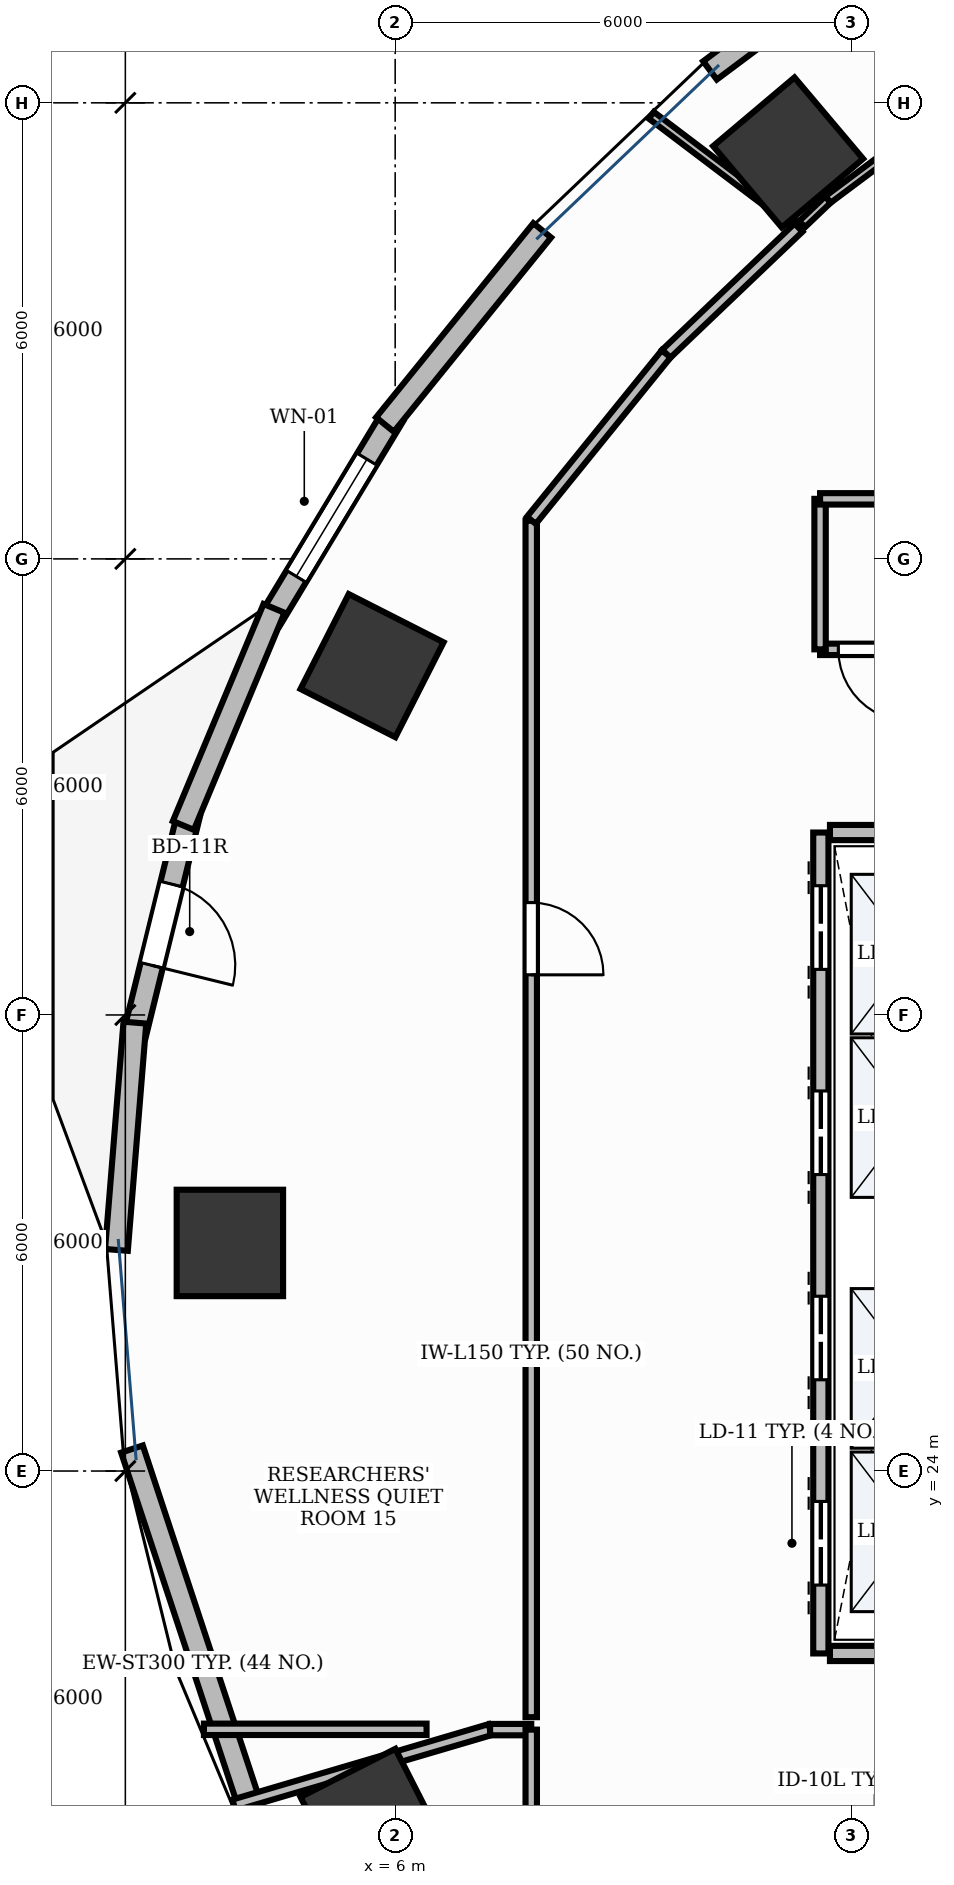
"""IFC4 building model, lengths in metres.
Left out: names, types, materials, properties, quantities, classifications, styles, units other than length and angle.
Written with IfcOpenShell. Run it as: python <this file> out.ifc"""

import sys

from ifc_helpers import new_model, si_unit, direction, frame, frame_2d, origin, origin_2d, place, context, subcontext, project, spatial, rectangle, extrude, element, fill, save


model = new_model("IFC4")
c1 = context("Model", 3, precision=1e-05, world=origin(), true_north=direction((0.0, 1.0)))
c2 = subcontext(c1, "Body", "Model", "MODEL_VIEW")
j1 = project(units=[si_unit("LENGTHUNIT", "METRE"), si_unit("PLANEANGLEUNIT", "RADIAN")], contexts=[c1])
p1 = place(None, origin())
s1 = spatial("IfcSite", under=j1, at=p1, CompositionType="ELEMENT")
p2 = place(p1, origin())
s2 = spatial("IfcBuilding", under=s1, at=p2, CompositionType="ELEMENT")
p3 = place(p2, frame((0.0, 0.0, 42.6)))
s3 = spatial("IfcBuildingStorey", under=s2, at=p3, CompositionType="ELEMENT", Elevation=42.6)
for number, where, z_axis, x_axis in (
    (1, (11.17, 41.347, -0.0), (0.0, 0.0, 1.0), (0.764, 0.645, 0.0)),
    (2, (5.696, 34.596, -0.0), (0.0, 0.0, 1.0), (0.453, 0.891, 0.0)),
    (3, (3.825, 27.001, -0.0), (0.0, 0.0, 1.0), (0.0, 1.0, 0.0)),
    (4, (5.696, 19.404, -0.0), (0.0, 0.0, 1.0), (-0.453, 0.891, 0.0)),
):
    element("IfcColumn", number, at=place(p3, frame(where, z_axis=z_axis, x_axis=x_axis)), inside=s3, PredefinedType="COLUMN", context=c2, shape_type="SweptSolid", body=[
        extrude(rectangle(XDim=1.4, YDim=1.4, at=origin_2d()), origin(), (0.0, 0.0, 1.0), 3.901),
    ])
p4 = place(p3, frame((5.975, 37.886, 0.0), z_axis=(0.0, 0.0, 1.0), x_axis=(-0.516447962267, -0.856318575222, 0.0)))
e5 = element("IfcWall", 5, at=p4, inside=s3, PredefinedType="STANDARD", context=c2, shape_type="SweptSolid", body=[
    extrude(rectangle(XDim=3.143, YDim=0.3, at=frame_2d((1.571, 0.0))), origin(), (0.0, 0.0, 1.0), 3.47),
])
p5 = place(p4, frame((0.671, 0.0, 0.9)))
e6 = element("IfcOpeningElement", 6, at=p5, cuts=e5, PredefinedType="OPENING", context=c2, shape_type="SweptSolid", body=[
    extrude(rectangle(XDim=1.8, YDim=2.1, at=frame_2d((0.9, 1.05))), frame((0.0, 0.165, 0.0), z_axis=(0.0, -1.0, 0.0), x_axis=(1.0, 0.0, 0.0)), (0.0, 0.0, 1.0), 0.33),
])
p6 = place(p3, frame((3.285, 32.641, 0.0), z_axis=(0.0, 0.0, 1.0), x_axis=(-0.238522035896, -0.971137085273, 0.0)))
e7 = element("IfcWall", 7, at=p6, inside=s3, PredefinedType="STANDARD", context=c2, shape_type="SweptSolid", body=[
    extrude(rectangle(XDim=2.993, YDim=0.3, at=frame_2d((1.497, 0.0))), origin(), (0.0, 0.0, 1.0), 3.9),
])
p7 = place(p6, frame((0.946, 0.0, 0.0)))
e8 = element("IfcOpeningElement", 8, at=p7, cuts=e7, PredefinedType="OPENING", context=c2, shape_type="SweptSolid", body=[
    extrude(rectangle(XDim=1.1, YDim=2.15, at=frame_2d((0.55, 1.075))), frame((0.0, 0.165, 0.0), z_axis=(0.0, -1.0, 0.0), x_axis=(1.0, 0.0, 0.0)), (0.0, 0.0, 1.0), 0.33),
])
p8 = place(p3, frame((12.961, 44.535, 0.0), z_axis=(0.0, 0.0, 1.0), x_axis=(-0.800823020995, -0.598901067827, 0.0)))
e9 = element("IfcWall", 9, at=p8, inside=s3, PredefinedType="STANDARD", context=c2, shape_type="SweptSolid", body=[
    extrude(rectangle(XDim=3.521, YDim=0.3, at=frame_2d((1.76, 0.0))), origin(), (0.0, 0.0, 1.0), 3.9),
])
p9 = place(p3, frame((7.934, 40.323, 0.0), z_axis=(0.0, 0.0, 1.0), x_axis=(-0.629221727718, -0.777225847079, 0.0)))
e10 = element("IfcWall", 10, at=p9, inside=s3, PredefinedType="STANDARD", context=c2, shape_type="SweptSolid", body=[
    extrude(rectangle(XDim=3.288, YDim=0.3, at=frame_2d((1.644, 0.0))), origin(), (0.0, 0.0, 1.0), 3.47),
])
p10 = place(p3, frame((4.406, 35.349, 0.0), z_axis=(0.0, 0.0, 1.0), x_axis=(-0.38535448421, -0.922768617531, 0.0)))
e11 = element("IfcWall", 11, at=p10, inside=s3, PredefinedType="STANDARD", context=c2, shape_type="SweptSolid", body=[
    extrude(rectangle(XDim=3.095, YDim=0.3, at=frame_2d((1.548, 0.0))), origin(), (0.0, 0.0, 1.0), 3.9),
])
p11 = place(p3, frame((2.576, 29.899, 0.0), z_axis=(0.0, 0.0, 1.0), x_axis=(-0.080890160317, -0.996723021689, 0.0)))
e12 = element("IfcWall", 12, at=p11, inside=s3, PredefinedType="STANDARD", context=c2, shape_type="SweptSolid", body=[
    extrude(rectangle(XDim=3.0, YDim=0.3, at=frame_2d((1.5, 0.0))), origin(), (0.0, 0.0, 1.0), 3.9),
])
p12 = place(p3, frame((2.537, 24.289, 0.0), z_axis=(0.0, 0.0, 1.0), x_axis=(0.31372816724, -0.949512841978, 0.0)))
e13 = element("IfcWall", 13, at=p12, inside=s3, PredefinedType="STANDARD", context=c2, shape_type="SweptSolid", body=[
    extrude(rectangle(XDim=5.951, YDim=0.3, at=frame_2d((2.976, 0.0))), origin(), (0.0, 0.0, 1.0), 3.9),
])
p13 = place(p3, frame((11.6, 21.6, 0.0), z_axis=(0.0, 0.0, 1.0), x_axis=(0.0, 1.0, 0.0)))
e14 = element("IfcWall", 14, at=p13, inside=s3, PredefinedType="PARTITIONING", context=c2, shape_type="SweptSolid", body=[
    extrude(rectangle(XDim=10.8, YDim=0.2, at=frame_2d((5.4, 0.0))), origin(), (0.0, 0.0, 1.0), 2.91),
])
p14 = place(p13, frame((0.9, 0.0, 0.0)))
e15 = element("IfcOpeningElement", 15, at=p14, cuts=e14, PredefinedType="OPENING", context=c2, shape_type="SweptSolid", body=[
    extrude(rectangle(XDim=1.1, YDim=2.2, at=frame_2d((0.55, 1.1))), frame((0.0, 0.115, 0.0), z_axis=(0.0, -1.0, 0.0), x_axis=(1.0, 0.0, 0.0)), (0.0, 0.0, 1.0), 0.23),
])
p15 = place(p13, frame((3.6, 0.0, 0.0)))
e16 = element("IfcOpeningElement", 16, at=p15, cuts=e14, PredefinedType="OPENING", context=c2, shape_type="SweptSolid", body=[
    extrude(rectangle(XDim=1.1, YDim=2.2, at=frame_2d((0.55, 1.1))), frame((0.0, 0.115, 0.0), z_axis=(0.0, -1.0, 0.0), x_axis=(1.0, 0.0, 0.0)), (0.0, 0.0, 1.0), 0.23),
])
p16 = place(p13, frame((6.3, 0.0, 0.0)))
e17 = element("IfcOpeningElement", 17, at=p16, cuts=e14, PredefinedType="OPENING", context=c2, shape_type="SweptSolid", body=[
    extrude(rectangle(XDim=1.1, YDim=2.2, at=frame_2d((0.55, 1.1))), frame((0.0, 0.115, 0.0), z_axis=(0.0, -1.0, 0.0), x_axis=(1.0, 0.0, 0.0)), (0.0, 0.0, 1.0), 0.23),
])
p17 = place(p13, frame((9.0, 0.0, 0.0)))
e18 = element("IfcOpeningElement", 18, at=p17, cuts=e14, PredefinedType="OPENING", context=c2, shape_type="SweptSolid", body=[
    extrude(rectangle(XDim=1.1, YDim=2.2, at=frame_2d((0.55, 1.1))), frame((0.0, 0.115, 0.0), z_axis=(0.0, -1.0, 0.0), x_axis=(1.0, 0.0, 0.0)), (0.0, 0.0, 1.0), 0.23),
])
for number, where, z_axis, x_axis in (
    (19, (11.72, 21.6, 0.0), (0.0, 0.0, 1.0), (1.0, 0.0, 0.0)),
    (20, (11.72, 32.4, 0.0), (0.0, 0.0, 1.0), (1.0, 0.0, 0.0)),
):
    element("IfcWall", number, at=place(p3, frame(where, z_axis=z_axis, x_axis=x_axis)), inside=s3, PredefinedType="PARTITIONING", context=c2, shape_type="SweptSolid", body=[
        extrude(rectangle(XDim=2.16, YDim=0.2, at=frame_2d((1.08, 0.0))), origin(), (0.0, 0.0, 1.0), 2.91),
    ])
p18 = place(p3, frame((21.74, 34.81, 0.0), z_axis=(0.0, 0.0, 1.0), x_axis=(-1.0, 0.0, 0.0)))
e21 = element("IfcWall", 21, at=p18, inside=s3, PredefinedType="PARTITIONING", context=c2, shape_type="SweptSolid", body=[
    extrude(rectangle(XDim=10.15, YDim=0.15, at=frame_2d((5.075, 0.0))), origin(), (0.0, 0.0, 1.0), 2.91),
])
p19 = place(p18, frame((8.96, 0.0, 0.0)))
e22 = element("IfcOpeningElement", 22, at=p19, cuts=e21, PredefinedType="OPENING", context=c2, shape_type="SweptSolid", body=[
    extrude(rectangle(XDim=0.95, YDim=2.15, at=frame_2d((0.475, 1.075))), frame((0.0, 0.09, 0.0), z_axis=(0.0, -1.0, 0.0), x_axis=(1.0, 0.0, 0.0)), (0.0, 0.0, 1.0), 0.18),
])
p20 = place(p3, frame((7.79, 36.501, 0.0), z_axis=(0.0, 0.0, 1.0), x_axis=(0.0, -1.0, 0.0)))
e23 = element("IfcWall", 23, at=p20, inside=s3, PredefinedType="PARTITIONING", context=c2, shape_type="SweptSolid", body=[
    extrude(rectangle(XDim=15.74, YDim=0.15, at=frame_2d((7.87, 0.0))), origin(), (0.0, 0.0, 1.0), 2.91),
])
p21 = place(p20, frame((5.023, 0.0, 0.0)))
e24 = element("IfcOpeningElement", 24, at=p21, cuts=e23, PredefinedType="OPENING", context=c2, shape_type="SweptSolid", body=[
    extrude(rectangle(XDim=0.95, YDim=2.15, at=frame_2d((0.475, 1.075))), frame((0.0, 0.09, 0.0), z_axis=(0.0, -1.0, 0.0), x_axis=(1.0, 0.0, 0.0)), (0.0, 0.0, 1.0), 0.18),
])
p22 = place(p3, frame((3.879, 19.605, 0.0), z_axis=(0.0, 0.0, 1.0), x_axis=(0.959249199887, 0.282561449097, 0.0)))
e25 = element("IfcWall", 25, at=p22, inside=s3, PredefinedType="PARTITIONING", context=c2, shape_type="SweptSolid", body=[
    extrude(rectangle(XDim=3.512, YDim=0.15, at=frame_2d((1.756, 0.0))), origin(), (0.0, 0.0, 1.0), 2.91),
])
p23 = place(p3, frame((7.249, 20.598, 0.0), z_axis=(0.0, 0.0, 1.0), x_axis=(1.0, 0.0, 0.0)))
e26 = element("IfcWall", 26, at=p23, inside=s3, PredefinedType="PARTITIONING", context=c2, shape_type="SweptSolid", body=[
    extrude(rectangle(XDim=0.542, YDim=0.15, at=frame_2d((0.271, 0.0))), origin(), (0.0, 0.0, 1.0), 2.91),
])
p24 = place(p3, frame((7.79, 20.598, 0.0), z_axis=(0.0, 0.0, 1.0), x_axis=(0.0, -1.0, 0.0)))
e27 = element("IfcWall", 27, at=p24, inside=s3, PredefinedType="PARTITIONING", context=c2, shape_type="SweptSolid", body=[
    extrude(rectangle(XDim=3.099, YDim=0.15, at=frame_2d((1.55, 0.0))), origin(), (0.0, 0.0, 1.0), 2.91),
])
p25 = place(p3, frame((14.16, 42.572, 0.0), z_axis=(0.0, 0.0, 1.0), x_axis=(-0.800808090092, -0.598921032227, 0.0)))
e28 = element("IfcWall", 28, at=p25, inside=s3, PredefinedType="MOVABLE", context=c2, shape_type="SweptSolid", body=[
    extrude(rectangle(XDim=3.079, YDim=0.11, at=frame_2d((1.54, 0.0))), origin(), (0.0, 0.0, 1.0), 2.91),
])
p26 = place(p3, frame((11.693, 40.727, 0.0), z_axis=(0.0, 0.0, 1.0), x_axis=(-0.72367263626, -0.690143402148, 0.0)))
e29 = element("IfcWall", 29, at=p26, inside=s3, PredefinedType="MOVABLE", context=c2, shape_type="SweptSolid", body=[
    extrude(rectangle(XDim=0.524, YDim=0.11, at=frame_2d((0.262, 0.0))), origin(), (0.0, 0.0, 1.0), 2.91),
])
p27 = place(p3, frame((11.314, 40.365, 0.0), z_axis=(0.0, 0.0, 1.0), x_axis=(-0.797445450475, 0.603391045274, 0.0)))
e30 = element("IfcWall", 30, at=p27, inside=s3, PredefinedType="MOVABLE", context=c2, shape_type="SweptSolid", body=[
    extrude(rectangle(XDim=2.438, YDim=0.11, at=frame_2d((1.219, 0.0))), origin(), (0.0, 0.0, 1.0), 2.91),
])
p28 = place(p3, frame((11.59, 34.81, 0.0), z_axis=(0.0, 0.0, 1.0), x_axis=(0.0, 1.0, 0.0)))
e31 = element("IfcWall", 31, at=p28, inside=s3, PredefinedType="PARTITIONING", context=c2, shape_type="SweptSolid", body=[
    extrude(rectangle(XDim=1.98, YDim=0.15, at=frame_2d((0.99, 0.0))), origin(), (0.0, 0.0, 1.0), 2.91),
])
p29 = place(p3, frame((11.59, 36.79, 0.0), z_axis=(0.0, 0.0, 1.0), x_axis=(1.0, 0.0, 0.0)))
e32 = element("IfcWall", 32, at=p29, inside=s3, PredefinedType="PARTITIONING", context=c2, shape_type="SweptSolid", body=[
    extrude(rectangle(XDim=5.21, YDim=0.15, at=frame_2d((2.605, 0.0))), origin(), (0.0, 0.0, 1.0), 2.91),
])
p30 = place(p3, frame((11.307, 40.358, 0.0), z_axis=(0.0, 0.0, 1.0), x_axis=(-0.723655021688, -0.690161872017, 0.0)))
e33 = element("IfcWall", 33, at=p30, inside=s3, PredefinedType="PARTITIONING", context=c2, shape_type="SweptSolid", body=[
    extrude(rectangle(XDim=2.406, YDim=0.15, at=frame_2d((1.203, 0.0))), origin(), (0.0, 0.0, 1.0), 2.91),
])
p31 = place(p3, frame((9.565, 38.697, 0.0), z_axis=(0.0, 0.0, 1.0), x_axis=(-0.629270515505, -0.777186347227, 0.0)))
e34 = element("IfcWall", 34, at=p31, inside=s3, PredefinedType="PARTITIONING", context=c2, shape_type="SweptSolid", body=[
    extrude(rectangle(XDim=2.817, YDim=0.15, at=frame_2d((1.409, 0.0))), origin(), (0.0, 0.0, 1.0), 2.91),
])
p32 = place(p3, frame((6.413, 20.602, 0.0), z_axis=(0.0, 0.0, 1.0), x_axis=(-1.0, 0.0, 0.0)))
e35 = element("IfcWall", 35, at=p32, inside=s3, PredefinedType="PARTITIONING", context=c2, shape_type="SweptSolid", body=[
    extrude(rectangle(XDim=2.929, YDim=0.15, at=frame_2d((1.464, 0.0))), origin(), (0.0, 0.0, 1.0), 2.91),
])
p33 = place(p5, origin())
e36 = element("IfcWindow", 36, at=p33, inside=s3, PartitioningType="SINGLE_PANEL", PredefinedType="WINDOW", context=c2, shape_type="SweptSolid", body=[
    extrude(rectangle(XDim=1.8, YDim=2.1, at=frame_2d((0.9, 1.05))), frame((0.0, 0.03, 0.0), z_axis=(0.0, -1.0, 0.0), x_axis=(1.0, 0.0, 0.0)), (0.0, 0.0, 1.0), 0.06),
])
fill(e6, e36)
p34 = place(p7, origin())
e37 = element("IfcDoor", 37, at=p34, inside=s3, OperationType="SINGLE_SWING_RIGHT", PredefinedType="DOOR", context=c2, shape_type="SweptSolid", body=[
    extrude(rectangle(XDim=1.1, YDim=2.15, at=frame_2d((0.55, 1.075))), frame((0.0, 0.025, 0.0), z_axis=(0.0, -1.0, 0.0), x_axis=(1.0, 0.0, 0.0)), (0.0, 0.0, 1.0), 0.05),
])
fill(e8, e37)
p35 = place(p14, origin())
e38 = element("IfcDoor", 38, at=p35, inside=s3, OperationType="DOUBLE_DOOR_SLIDING", PredefinedType="DOOR", context=c2, shape_type="SweptSolid", body=[
    extrude(rectangle(XDim=1.1, YDim=2.2, at=frame_2d((0.55, 1.1))), frame((0.0, 0.025, 0.0), z_axis=(0.0, -1.0, 0.0), x_axis=(1.0, 0.0, 0.0)), (0.0, 0.0, 1.0), 0.05),
])
fill(e15, e38)
p36 = place(p15, origin())
e39 = element("IfcDoor", 39, at=p36, inside=s3, OperationType="DOUBLE_DOOR_SLIDING", PredefinedType="DOOR", context=c2, shape_type="SweptSolid", body=[
    extrude(rectangle(XDim=1.1, YDim=2.2, at=frame_2d((0.55, 1.1))), frame((0.0, 0.025, 0.0), z_axis=(0.0, -1.0, 0.0), x_axis=(1.0, 0.0, 0.0)), (0.0, 0.0, 1.0), 0.05),
])
fill(e16, e39)
p37 = place(p16, origin())
e40 = element("IfcDoor", 40, at=p37, inside=s3, OperationType="DOUBLE_DOOR_SLIDING", PredefinedType="DOOR", context=c2, shape_type="SweptSolid", body=[
    extrude(rectangle(XDim=1.1, YDim=2.2, at=frame_2d((0.55, 1.1))), frame((0.0, 0.025, 0.0), z_axis=(0.0, -1.0, 0.0), x_axis=(1.0, 0.0, 0.0)), (0.0, 0.0, 1.0), 0.05),
])
fill(e17, e40)
p38 = place(p17, origin())
e41 = element("IfcDoor", 41, at=p38, inside=s3, OperationType="DOUBLE_DOOR_SLIDING", PredefinedType="DOOR", context=c2, shape_type="SweptSolid", body=[
    extrude(rectangle(XDim=1.1, YDim=2.2, at=frame_2d((0.55, 1.1))), frame((0.0, 0.025, 0.0), z_axis=(0.0, -1.0, 0.0), x_axis=(1.0, 0.0, 0.0)), (0.0, 0.0, 1.0), 0.05),
])
fill(e18, e41)
p39 = place(p19, origin())
e42 = element("IfcDoor", 42, at=p39, inside=s3, OperationType="SINGLE_SWING_LEFT", PredefinedType="DOOR", context=c2, shape_type="SweptSolid", body=[
    extrude(rectangle(XDim=0.95, YDim=2.15, at=frame_2d((0.475, 1.075))), frame((0.0, 0.025, 0.0), z_axis=(0.0, -1.0, 0.0), x_axis=(1.0, 0.0, 0.0)), (0.0, 0.0, 1.0), 0.05),
])
fill(e22, e42)
p40 = place(p21, origin())
e43 = element("IfcDoor", 43, at=p40, inside=s3, OperationType="SINGLE_SWING_RIGHT", PredefinedType="DOOR", context=c2, shape_type="SweptSolid", body=[
    extrude(rectangle(XDim=0.95, YDim=2.15, at=frame_2d((0.475, 1.075))), frame((0.0, 0.025, 0.0), z_axis=(0.0, -1.0, 0.0), x_axis=(1.0, 0.0, 0.0)), (0.0, 0.0, 1.0), 0.05),
])
fill(e24, e43)
save(model, sys.argv[1])
